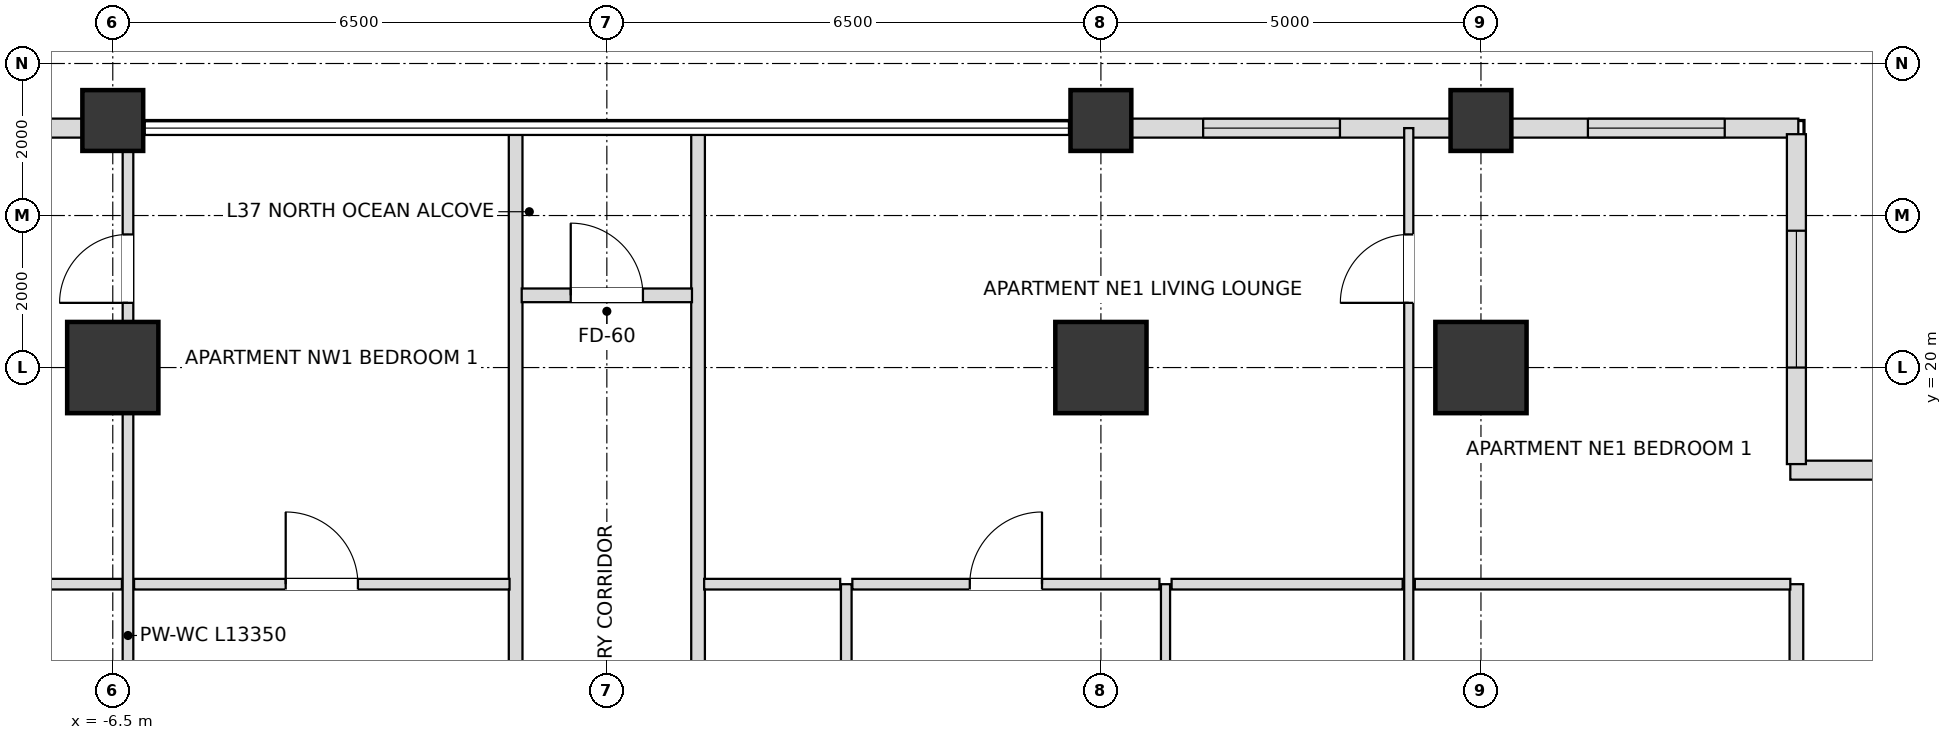
"""IFC4 building model, lengths in metres.
Left out: names, types, materials, properties, quantities, classifications, styles, units other than length and angle.
Written with IfcOpenShell. Run it as: python <this file> out.ifc"""

import sys

from ifc_helpers import new_model, si_unit, direction, frame, frame_2d, origin, origin_2d, place, context, subcontext, project, spatial, rectangle, extrude, element, fill, save


model = new_model("IFC4")
c1 = context("Model", 3, precision=1e-05, world=origin(), true_north=direction((0.0, 1.0)))
c2 = subcontext(c1, "Body", "Model", "MODEL_VIEW")
j1 = project(units=[si_unit("LENGTHUNIT", "METRE"), si_unit("PLANEANGLEUNIT", "RADIAN")], contexts=[c1])
p1 = place(None, origin())
s1 = spatial("IfcSite", under=j1, at=p1, CompositionType="ELEMENT")
p2 = place(p1, origin())
s2 = spatial("IfcBuilding", under=s1, at=p2, CompositionType="ELEMENT")
p3 = place(p2, frame((0.0, 0.0, 147.6)))
s3 = spatial("IfcBuildingStorey", under=s2, at=p3, CompositionType="ELEMENT", Elevation=147.6)
for number, where, z_axis, x_axis in (
    (1, (11.5, 20.0, 0.0), (0.0, 0.0, 1.0), (1.0, 0.0, 0.0)),
    (2, (6.5, 20.0, 0.0), (0.0, 0.0, 1.0), (1.0, 0.0, 0.0)),
    (3, (-6.5, 20.0, 0.0), (0.0, 0.0, 1.0), (1.0, 0.0, 0.0)),
):
    element("IfcColumn", number, at=place(p3, frame(where, z_axis=z_axis, x_axis=x_axis)), inside=s3, PredefinedType="USERDEFINED", context=c2, shape_type="SweptSolid", body=[
        extrude(rectangle(XDim=1.2, YDim=1.2, at=origin_2d()), origin(), (0.0, 0.0, 1.0), 3.6),
    ])
for number, where, z_axis, x_axis in (
    (4, (-6.5, 23.25, 0.0), (0.0, 0.0, 1.0), (1.0, 0.0, 0.0)),
    (5, (6.5, 23.25, 0.0), (0.0, 0.0, 1.0), (1.0, 0.0, 0.0)),
    (6, (11.5, 23.25, 0.0), (0.0, 0.0, 1.0), (1.0, 0.0, 0.0)),
):
    element("IfcColumn", number, at=place(p3, frame(where, z_axis=z_axis, x_axis=x_axis)), inside=s3, PredefinedType="COLUMN", context=c2, shape_type="SweptSolid", body=[
        extrude(rectangle(XDim=0.8, YDim=0.8, at=origin_2d()), origin(), (0.0, 0.0, 1.0), 3.6),
    ])
p4 = place(p3, frame((15.675, 23.15, 0.0), z_axis=(0.0, 0.0, 1.0), x_axis=(-1.0, 0.0, 0.0)))
e7 = element("IfcWall", 7, at=p4, inside=s3, PredefinedType="SOLIDWALL", context=c2, shape_type="SweptSolid", body=[
    extrude(rectangle(XDim=3.78, YDim=0.25, at=frame_2d((1.89, 0.0))), origin(), (0.0, 0.0, 1.0), 2.736),
])
p5 = place(p4, frame((0.968, 0.0, 0.72)))
e8 = element("IfcOpeningElement", 8, at=p5, cuts=e7, PredefinedType="OPENING", context=c2, shape_type="SweptSolid", body=[
    extrude(rectangle(XDim=1.8, YDim=1.68, at=frame_2d((0.9, 0.84))), frame((0.0, 0.135, 0.0), z_axis=(0.0, -1.0, 0.0), x_axis=(1.0, 0.0, 0.0)), (0.0, 0.0, 1.0), 0.27),
])
p6 = place(p3, frame((11.105, 23.15, 0.0), z_axis=(0.0, 0.0, 1.0), x_axis=(-1.0, 0.0, 0.0)))
e9 = element("IfcWall", 9, at=p6, inside=s3, PredefinedType="SOLIDWALL", context=c2, shape_type="SweptSolid", body=[
    extrude(rectangle(XDim=4.21, YDim=0.25, at=frame_2d((2.105, 0.0))), origin(), (0.0, 0.0, 1.0), 2.736),
])
p7 = place(p6, frame((1.46, 0.0, 0.72)))
e10 = element("IfcOpeningElement", 10, at=p7, cuts=e9, PredefinedType="OPENING", context=c2, shape_type="SweptSolid", body=[
    extrude(rectangle(XDim=1.8, YDim=1.68, at=frame_2d((0.9, 0.84))), frame((0.0, 0.135, 0.0), z_axis=(0.0, -1.0, 0.0), x_axis=(1.0, 0.0, 0.0)), (0.0, 0.0, 1.0), 0.27),
])
p8 = place(p3, frame((-6.895, 23.15, 0.0), z_axis=(0.0, 0.0, 1.0), x_axis=(-1.0, 0.0, 0.0)))
e11 = element("IfcWall", 11, at=p8, inside=s3, PredefinedType="SOLIDWALL", context=c2, shape_type="SweptSolid", body=[
    extrude(rectangle(XDim=4.21, YDim=0.25, at=frame_2d((2.105, 0.0))), origin(), (0.0, 0.0, 1.0), 2.736),
])
p9 = place(p8, frame((1.205, 0.0, 0.72)))
e12 = element("IfcOpeningElement", 12, at=p9, cuts=e11, PredefinedType="OPENING", context=c2, shape_type="SweptSolid", body=[
    extrude(rectangle(XDim=1.8, YDim=1.68, at=frame_2d((0.9, 0.84))), frame((0.0, 0.135, 0.0), z_axis=(0.0, -1.0, 0.0), x_axis=(1.0, 0.0, 0.0)), (0.0, 0.0, 1.0), 0.27),
])
p10 = place(p3, frame((20.23, 18.65, 0.0), z_axis=(0.0, 0.0, 1.0), x_axis=(-1.0, 0.0, 0.0)))
e13 = element("IfcWall", 13, at=p10, inside=s3, PredefinedType="SOLIDWALL", context=c2, shape_type="SweptSolid", body=[
    extrude(rectangle(XDim=4.66, YDim=0.25, at=frame_2d((2.33, 0.0))), origin(), (0.0, 0.0, 1.0), 2.736),
])
p11 = place(p10, frame((1.43, 0.0, 0.72)))
e14 = element("IfcOpeningElement", 14, at=p11, cuts=e13, PredefinedType="OPENING", context=c2, shape_type="SweptSolid", body=[
    extrude(rectangle(XDim=1.8, YDim=1.68, at=frame_2d((0.9, 0.84))), frame((0.0, 0.135, 0.0), z_axis=(0.0, -1.0, 0.0), x_axis=(1.0, 0.0, 0.0)), (0.0, 0.0, 1.0), 0.27),
])
p12 = place(p3, frame((15.65, 18.73, 0.0), z_axis=(0.0, 0.0, 1.0), x_axis=(0.0, 1.0, 0.0)))
e15 = element("IfcWall", 15, at=p12, inside=s3, PredefinedType="SOLIDWALL", context=c2, shape_type="SweptSolid", body=[
    extrude(rectangle(XDim=4.34, YDim=0.25, at=frame_2d((2.17, 0.0))), origin(), (0.0, 0.0, 1.0), 2.736),
])
p13 = place(p12, frame((1.27, 0.0, 0.72)))
e16 = element("IfcOpeningElement", 16, at=p13, cuts=e15, PredefinedType="OPENING", context=c2, shape_type="SweptSolid", body=[
    extrude(rectangle(XDim=1.8, YDim=1.68, at=frame_2d((0.9, 0.84))), frame((0.0, 0.135, 0.0), z_axis=(0.0, -1.0, 0.0), x_axis=(1.0, 0.0, 0.0)), (0.0, 0.0, 1.0), 0.27),
])
p14 = place(p3, frame((-6.3, 9.8, 0.0), z_axis=(0.0, 0.0, 1.0), x_axis=(0.0, 1.0, 0.0)))
e17 = element("IfcWall", 17, at=p14, inside=s3, PredefinedType="PARTITIONING", context=c2, shape_type="SweptSolid", body=[
    extrude(rectangle(XDim=13.35, YDim=0.14, at=frame_2d((6.675, 0.0))), origin(), (0.0, 0.0, 1.0), 2.816),
])
p15 = place(p14, frame((11.051, 0.0, 0.0)))
e18 = element("IfcOpeningElement", 18, at=p15, cuts=e17, PredefinedType="OPENING", context=c2, shape_type="SweptSolid", body=[
    extrude(rectangle(XDim=0.9, YDim=2.1, at=frame_2d((0.45, 1.05))), frame((0.0, 0.08, 0.0), z_axis=(0.0, -1.0, 0.0), x_axis=(1.0, 0.0, 0.0)), (0.0, 0.0, 1.0), 0.16),
])
for number, where, z_axis, x_axis in (
    (19, (-1.2, 9.8, 0.0), (0.0, 0.0, 1.0), (0.0, 1.0, 0.0)),
    (20, (1.2, 9.8, 0.0), (0.0, 0.0, 1.0), (0.0, 1.0, 0.0)),
):
    element("IfcWall", number, at=place(p3, frame(where, z_axis=z_axis, x_axis=x_axis)), inside=s3, PredefinedType="PARTITIONING", context=c2, shape_type="SweptSolid", body=[
        extrude(rectangle(XDim=13.35, YDim=0.18, at=frame_2d((6.675, 0.0))), origin(), (0.0, 0.0, 1.0), 2.816),
    ])
p16 = place(p3, frame((3.15, 9.8, 0.0), z_axis=(0.0, 0.0, 1.0), x_axis=(0.0, 1.0, 0.0)))
e21 = element("IfcWall", 21, at=p16, inside=s3, PredefinedType="PARTITIONING", context=c2, shape_type="SweptSolid", body=[
    extrude(rectangle(XDim=7.35, YDim=0.14, at=frame_2d((3.675, 0.0))), origin(), (0.0, 0.0, 1.0), 3.38),
])
p17 = place(p16, frame((3.22, 0.0, 0.0)))
e22 = element("IfcOpeningElement", 22, at=p17, cuts=e21, PredefinedType="OPENING", context=c2, shape_type="SweptSolid", body=[
    extrude(rectangle(XDim=0.9, YDim=2.1, at=frame_2d((0.45, 1.05))), frame((0.0, 0.08, 0.0), z_axis=(0.0, -1.0, 0.0), x_axis=(1.0, 0.0, 0.0)), (0.0, 0.0, 1.0), 0.16),
])
p18 = place(p3, frame((7.35, 9.8, 0.0), z_axis=(0.0, 0.0, 1.0), x_axis=(0.0, 1.0, 0.0)))
e23 = element("IfcWall", 23, at=p18, inside=s3, PredefinedType="PARTITIONING", context=c2, shape_type="SweptSolid", body=[
    extrude(rectangle(XDim=7.35, YDim=0.12, at=frame_2d((3.675, 0.0))), origin(), (0.0, 0.0, 1.0), 2.816),
])
p19 = place(p18, frame((3.195, 0.0, 0.0)))
e24 = element("IfcOpeningElement", 24, at=p19, cuts=e23, PredefinedType="OPENING", context=c2, shape_type="SweptSolid", body=[
    extrude(rectangle(XDim=0.95, YDim=2.1, at=frame_2d((0.475, 1.05))), frame((0.0, 0.07, 0.0), z_axis=(0.0, -1.0, 0.0), x_axis=(1.0, 0.0, 0.0)), (0.0, 0.0, 1.0), 0.14),
])
p20 = place(p3, frame((10.55, 9.8, 0.0), z_axis=(0.0, 0.0, 1.0), x_axis=(0.0, 1.0, 0.0)))
e25 = element("IfcWall", 25, at=p20, inside=s3, PredefinedType="PARTITIONING", context=c2, shape_type="SweptSolid", body=[
    extrude(rectangle(XDim=13.35, YDim=0.12, at=frame_2d((6.675, 0.0))), origin(), (0.0, 0.0, 1.0), 2.816),
])
p21 = place(p20, frame((3.713, 0.0, 0.0)))
e26 = element("IfcOpeningElement", 26, at=p21, cuts=e25, PredefinedType="OPENING", context=c2, shape_type="SweptSolid", body=[
    extrude(rectangle(XDim=0.95, YDim=2.1, at=frame_2d((0.475, 1.05))), frame((0.0, 0.07, 0.0), z_axis=(0.0, -1.0, 0.0), x_axis=(1.0, 0.0, 0.0)), (0.0, 0.0, 1.0), 0.14),
])
p22 = place(p20, frame((11.051, 0.0, 0.0)))
e27 = element("IfcOpeningElement", 27, at=p22, cuts=e25, PredefinedType="OPENING", context=c2, shape_type="SweptSolid", body=[
    extrude(rectangle(XDim=0.9, YDim=2.1, at=frame_2d((0.45, 1.05))), frame((0.0, 0.07, 0.0), z_axis=(0.0, -1.0, 0.0), x_axis=(1.0, 0.0, 0.0)), (0.0, 0.0, 1.0), 0.14),
])
p23 = place(p3, frame((15.65, 9.8, 0.0), z_axis=(0.0, 0.0, 1.0), x_axis=(0.0, 1.0, 0.0)))
e28 = element("IfcWall", 28, at=p23, inside=s3, PredefinedType="PARTITIONING", context=c2, shape_type="SweptSolid", body=[
    extrude(rectangle(XDim=7.35, YDim=0.18, at=frame_2d((3.675, 0.0))), origin(), (0.0, 0.0, 1.0), 2.736),
])
p24 = place(p3, frame((-8.17, 17.15, 0.0), z_axis=(0.0, 0.0, 1.0), x_axis=(1.0, 0.0, 0.0)))
e29 = element("IfcWall", 29, at=p24, inside=s3, PredefinedType="PARTITIONING", context=c2, shape_type="SweptSolid", body=[
    extrude(rectangle(XDim=1.79, YDim=0.14, at=frame_2d((0.895, 0.0))), origin(), (0.0, 0.0, 1.0), 2.816),
])
p25 = place(p3, frame((-6.22, 17.15, 0.0), z_axis=(0.0, 0.0, 1.0), x_axis=(1.0, 0.0, 0.0)))
e30 = element("IfcWall", 30, at=p25, inside=s3, PredefinedType="PARTITIONING", context=c2, shape_type="SweptSolid", body=[
    extrude(rectangle(XDim=4.94, YDim=0.14, at=frame_2d((2.47, 0.0))), origin(), (0.0, 0.0, 1.0), 3.38),
])
p26 = place(p25, frame((1.995, 0.0, 0.0)))
e31 = element("IfcOpeningElement", 31, at=p26, cuts=e30, PredefinedType="OPENING", context=c2, shape_type="SweptSolid", body=[
    extrude(rectangle(XDim=0.95, YDim=2.1, at=frame_2d((0.475, 1.05))), frame((0.0, 0.08, 0.0), z_axis=(0.0, -1.0, 0.0), x_axis=(1.0, 0.0, 0.0)), (0.0, 0.0, 1.0), 0.16),
])
p27 = place(p3, frame((1.28, 17.15, 0.0), z_axis=(0.0, 0.0, 1.0), x_axis=(1.0, 0.0, 0.0)))
e32 = element("IfcWall", 32, at=p27, inside=s3, PredefinedType="PARTITIONING", context=c2, shape_type="SweptSolid", body=[
    extrude(rectangle(XDim=1.79, YDim=0.14, at=frame_2d((0.895, 0.0))), origin(), (0.0, 0.0, 1.0), 3.38),
])
p28 = place(p3, frame((3.23, 17.15, 0.0), z_axis=(0.0, 0.0, 1.0), x_axis=(1.0, 0.0, 0.0)))
e33 = element("IfcWall", 33, at=p28, inside=s3, PredefinedType="PARTITIONING", context=c2, shape_type="SweptSolid", body=[
    extrude(rectangle(XDim=4.04, YDim=0.14, at=frame_2d((2.02, 0.0))), origin(), (0.0, 0.0, 1.0), 2.816),
])
p29 = place(p28, frame((1.545, 0.0, 0.0)))
e34 = element("IfcOpeningElement", 34, at=p29, cuts=e33, PredefinedType="OPENING", context=c2, shape_type="SweptSolid", body=[
    extrude(rectangle(XDim=0.95, YDim=2.1, at=frame_2d((0.475, 1.05))), frame((0.0, 0.08, 0.0), z_axis=(0.0, -1.0, 0.0), x_axis=(1.0, 0.0, 0.0)), (0.0, 0.0, 1.0), 0.16),
])
p30 = place(p3, frame((7.43, 17.15, 0.0), z_axis=(0.0, 0.0, 1.0), x_axis=(1.0, 0.0, 0.0)))
e35 = element("IfcWall", 35, at=p30, inside=s3, PredefinedType="PARTITIONING", context=c2, shape_type="SweptSolid", body=[
    extrude(rectangle(XDim=3.04, YDim=0.14, at=frame_2d((1.52, 0.0))), origin(), (0.0, 0.0, 1.0), 3.38),
])
p31 = place(p3, frame((10.63, 17.15, 0.0), z_axis=(0.0, 0.0, 1.0), x_axis=(1.0, 0.0, 0.0)))
e36 = element("IfcWall", 36, at=p31, inside=s3, PredefinedType="PARTITIONING", context=c2, shape_type="SweptSolid", body=[
    extrude(rectangle(XDim=4.94, YDim=0.14, at=frame_2d((2.47, 0.0))), origin(), (0.0, 0.0, 1.0), 2.736),
])
p32 = place(p3, frame((-1.12, 20.95, 0.0), z_axis=(0.0, 0.0, 1.0), x_axis=(1.0, 0.0, 0.0)))
e37 = element("IfcWall", 37, at=p32, inside=s3, PredefinedType="PARTITIONING", context=c2, shape_type="SweptSolid", body=[
    extrude(rectangle(XDim=2.24, YDim=0.18, at=frame_2d((1.12, 0.0))), origin(), (0.0, 0.0, 1.0), 3.38),
])
p33 = place(p32, frame((0.645, 0.0, 0.0)))
e38 = element("IfcOpeningElement", 38, at=p33, cuts=e37, PredefinedType="OPENING", context=c2, shape_type="SweptSolid", body=[
    extrude(rectangle(XDim=0.95, YDim=2.15, at=frame_2d((0.475, 1.075))), frame((0.0, 0.1, 0.0), z_axis=(0.0, -1.0, 0.0), x_axis=(1.0, 0.0, 0.0)), (0.0, 0.0, 1.0), 0.2),
])
p34 = place(p5, origin())
e39 = element("IfcWindow", 39, at=p34, inside=s3, PartitioningType="SINGLE_PANEL", PredefinedType="WINDOW", context=c2, shape_type="SweptSolid", body=[
    extrude(rectangle(XDim=1.8, YDim=1.68, at=frame_2d((0.9, 0.84))), frame((0.0, 0.03, 0.0), z_axis=(0.0, -1.0, 0.0), x_axis=(1.0, 0.0, 0.0)), (0.0, 0.0, 1.0), 0.06),
])
fill(e8, e39)
p35 = place(p7, origin())
e40 = element("IfcWindow", 40, at=p35, inside=s3, PartitioningType="SINGLE_PANEL", PredefinedType="WINDOW", context=c2, shape_type="SweptSolid", body=[
    extrude(rectangle(XDim=1.8, YDim=1.68, at=frame_2d((0.9, 0.84))), frame((0.0, 0.03, 0.0), z_axis=(0.0, -1.0, 0.0), x_axis=(1.0, 0.0, 0.0)), (0.0, 0.0, 1.0), 0.06),
])
fill(e10, e40)
p36 = place(p13, origin())
e41 = element("IfcWindow", 41, at=p36, inside=s3, PartitioningType="SINGLE_PANEL", PredefinedType="WINDOW", context=c2, shape_type="SweptSolid", body=[
    extrude(rectangle(XDim=1.8, YDim=1.68, at=frame_2d((0.9, 0.84))), frame((0.0, 0.03, 0.0), z_axis=(0.0, -1.0, 0.0), x_axis=(1.0, 0.0, 0.0)), (0.0, 0.0, 1.0), 0.06),
])
fill(e16, e41)
p37 = place(p33, origin())
e42 = element("IfcDoor", 42, at=p37, inside=s3, OperationType="SINGLE_SWING_LEFT", PredefinedType="DOOR", context=c2, shape_type="SweptSolid", body=[
    extrude(rectangle(XDim=0.95, YDim=2.15, at=frame_2d((0.475, 1.075))), frame((0.0, 0.025, 0.0), z_axis=(0.0, -1.0, 0.0), x_axis=(1.0, 0.0, 0.0)), (0.0, 0.0, 1.0), 0.05),
])
fill(e38, e42)
p38 = place(p26, origin())
e43 = element("IfcDoor", 43, at=p38, inside=s3, OperationType="SINGLE_SWING_LEFT", PredefinedType="DOOR", context=c2, shape_type="SweptSolid", body=[
    extrude(rectangle(XDim=0.95, YDim=2.1, at=frame_2d((0.475, 1.05))), frame((0.0, 0.025, 0.0), z_axis=(0.0, -1.0, 0.0), x_axis=(1.0, 0.0, 0.0)), (0.0, 0.0, 1.0), 0.05),
])
fill(e31, e43)
p39 = place(p15, origin())
e44 = element("IfcDoor", 44, at=p39, inside=s3, OperationType="SINGLE_SWING_LEFT", PredefinedType="DOOR", context=c2, shape_type="SweptSolid", body=[
    extrude(rectangle(XDim=0.9, YDim=2.1, at=frame_2d((0.45, 1.05))), frame((0.0, 0.025, 0.0), z_axis=(0.0, -1.0, 0.0), x_axis=(1.0, 0.0, 0.0)), (0.0, 0.0, 1.0), 0.05),
])
fill(e18, e44)
p40 = place(p29, origin())
e45 = element("IfcDoor", 45, at=p40, inside=s3, OperationType="SINGLE_SWING_RIGHT", PredefinedType="DOOR", context=c2, shape_type="SweptSolid", body=[
    extrude(rectangle(XDim=0.95, YDim=2.1, at=frame_2d((0.475, 1.05))), frame((0.0, 0.025, 0.0), z_axis=(0.0, -1.0, 0.0), x_axis=(1.0, 0.0, 0.0)), (0.0, 0.0, 1.0), 0.05),
])
fill(e34, e45)
p41 = place(p22, origin())
e46 = element("IfcDoor", 46, at=p41, inside=s3, OperationType="SINGLE_SWING_LEFT", PredefinedType="DOOR", context=c2, shape_type="SweptSolid", body=[
    extrude(rectangle(XDim=0.9, YDim=2.1, at=frame_2d((0.45, 1.05))), frame((0.0, 0.025, 0.0), z_axis=(0.0, -1.0, 0.0), x_axis=(1.0, 0.0, 0.0)), (0.0, 0.0, 1.0), 0.05),
])
fill(e27, e46)
save(model, sys.argv[1])
